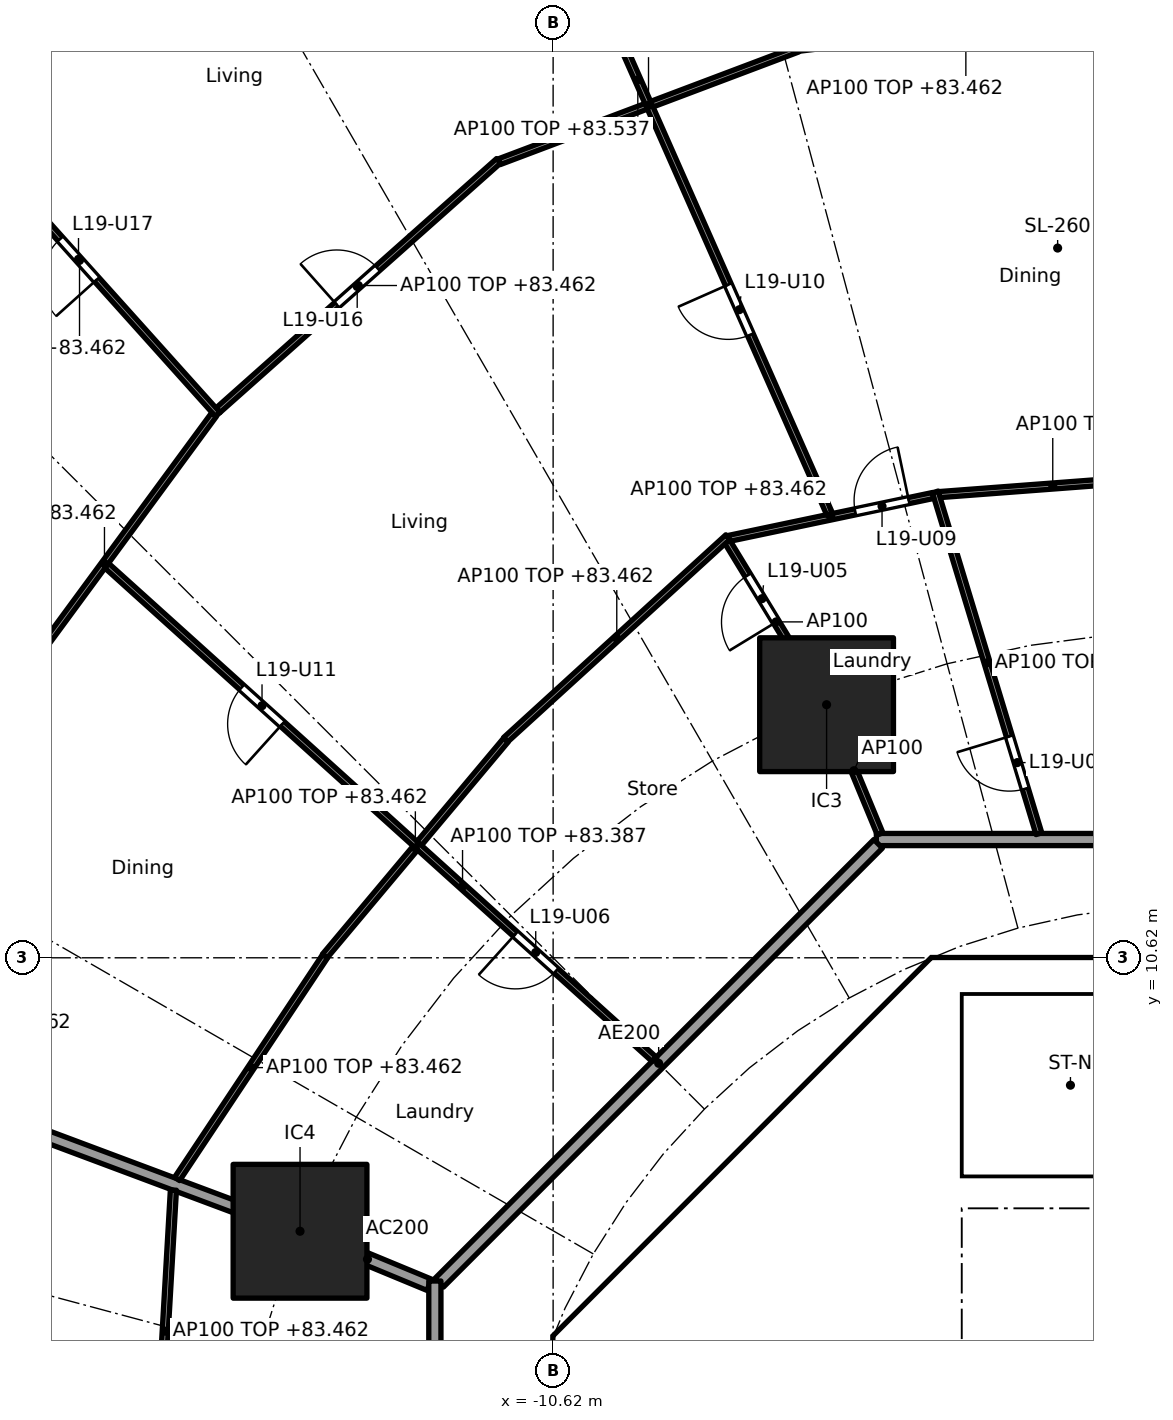
"""IFC4 building model, lengths in metres.
Left out: names, types, materials, properties, quantities, classifications, styles, units other than length and angle.
Written with IfcOpenShell. Run it as: python <this file> out.ifc"""

import sys

from ifc_helpers import new_model, si_unit, direction, frame, frame_2d, origin, origin_2d, place, context, subcontext, project, spatial, polyline, rectangle, outline, extrude, element, fill, save


model = new_model("IFC4")
c1 = context("Model", 3, precision=1e-05, world=origin(), true_north=direction((0.0, 1.0)))
c2 = subcontext(c1, "Body", "Model", "MODEL_VIEW")
j1 = project(units=[si_unit("LENGTHUNIT", "METRE"), si_unit("PLANEANGLEUNIT", "RADIAN")], contexts=[c1])
p1 = place(None, origin())
s1 = spatial("IfcSite", under=j1, at=p1, CompositionType="ELEMENT")
p2 = place(p1, origin())
s2 = spatial("IfcBuilding", under=s1, at=p2, CompositionType="ELEMENT")
p3 = place(p2, frame((0.0, 0.0, 80.7)))
s3 = spatial("IfcBuildingStorey", under=s2, at=p3, CompositionType="ELEMENT", Elevation=80.7)
for number, where, z_axis, x_axis in (
    (1, (-6.123, 14.782, 0.0), (0.0, 0.0, 1.0), (1.0, 0.0, 0.0)),
    (2, (-14.782, 6.123, 0.0), (0.0, 0.0, 1.0), (1.0, 0.0, 0.0)),
):
    element("IfcColumn", number, at=place(p3, frame(where, z_axis=z_axis, x_axis=x_axis)), inside=s3, PredefinedType="COLUMN", context=c2, shape_type="SweptSolid", body=[
        extrude(rectangle(XDim=2.2, YDim=2.2, at=origin_2d()), origin(), (0.0, 0.0, 1.0), 3.7),
    ])
p4 = place(p3, frame((-4.613, 9.988, 0.0), z_axis=(0.0, 0.0, 1.0), x_axis=(-0.707106781187, -0.707106781187, 0.0)))
e3 = element("IfcWall", 3, at=p4, inside=s3, PredefinedType="SHEAR", context=c2, shape_type="SweptSolid", body=[
    extrude(rectangle(XDim=7.602, YDim=0.6, at=frame_2d((3.801, 0.0))), origin(), (0.0, 0.0, 1.0), 3.44),
])
p5 = place(p4, frame((0.351, 0.0, 0.0)))
e4 = element("IfcOpeningElement", 4, at=p5, cuts=e3, PredefinedType="OPENING", context=c2, shape_type="SweptSolid", body=[
    extrude(rectangle(XDim=1.1, YDim=2.1, at=frame_2d((0.55, 1.05))), frame((0.0, 0.31, 0.0), z_axis=(0.0, -1.0, 0.0), x_axis=(1.0, 0.0, 0.0)), (0.0, 0.0, 1.0), 0.62),
])
p6 = place(p3, frame((-5.8, 4.3, 0.0), z_axis=(0.0, 0.0, 1.0), x_axis=(0.0, 1.0, 0.0)))
e5 = element("IfcWall", 5, at=p6, inside=s3, PredefinedType="PARTITIONING", context=c2, shape_type="SweptSolid", body=[
    extrude(rectangle(XDim=3.927, YDim=0.15, at=frame_2d((1.963, 0.0))), origin(), (0.0, 0.0, 1.0), 3.44),
])
p7 = place(p6, frame((1.551, 0.0, 0.0)))
e6 = element("IfcOpeningElement", 6, at=p7, cuts=e5, PredefinedType="OPENING", context=c2, shape_type="SweptSolid", body=[
    extrude(rectangle(XDim=0.9, YDim=2.1, at=frame_2d((0.45, 1.05))), frame((0.0, 0.085, 0.0), z_axis=(0.0, -1.0, 0.0), x_axis=(1.0, 0.0, 0.0)), (0.0, 0.0, 1.0), 0.17),
])
p8 = place(p3, frame((-4.0, 4.3, 0.0), z_axis=(0.0, 0.0, 1.0), x_axis=(0.0, 1.0, 0.0)))
e7 = element("IfcWall", 7, at=p8, inside=s3, PredefinedType="SOLIDWALL", context=c2, shape_type="SweptSolid", body=[
    extrude(rectangle(XDim=2.2, YDim=0.2, at=frame_2d((1.1, 0.0))), origin(), (0.0, 0.0, 1.0), 3.44),
])
p9 = place(p8, frame((0.55, 0.0, 0.0)))
e8 = element("IfcOpeningElement", 8, at=p9, cuts=e7, PredefinedType="OPENING", context=c2, shape_type="SweptSolid", body=[
    extrude(rectangle(XDim=1.1, YDim=2.1, at=frame_2d((0.55, 1.05))), frame((0.0, 0.11, 0.0), z_axis=(0.0, -1.0, 0.0), x_axis=(1.0, 0.0, 0.0)), (0.0, 0.0, 1.0), 0.22),
])
p10 = place(p3, origin())
e9 = element("IfcWall", 9, at=p10, inside=s3, PredefinedType="SHEAR", context=c2, shape_type="SweptSolid", body=[
    extrude(outline(polyline([(-10.2, 4.825), (-9.776, 4.401), (-10.025, 4.152), (-10.025, 3.801), (-10.625, 3.801), (-10.625, 4.401), (-10.2, 4.825)])), origin(), (0.0, 0.0, 1.0), 3.44),
])
p11 = place(p3, origin())
e10 = element("IfcWall", 10, at=p11, inside=s3, PredefinedType="SHEAR", context=c2, shape_type="SweptSolid", body=[
    extrude(outline(polyline([(-4.152, 10.025), (-4.401, 9.776), (-4.825, 10.2), (-4.401, 10.625), (4.401, 10.625), (4.825, 10.2), (4.401, 9.776), (4.152, 10.025), (-4.152, 10.025)])), origin(), (0.0, 0.0, 1.0), 3.44),
])
p12 = place(p3, origin())
e11 = element("IfcWall", 11, at=p12, inside=s3, PredefinedType="SOLIDWALL", context=c2, shape_type="SweptSolid", body=[
    extrude(outline(polyline([(-3.9, 7.025), (-4.1, 7.025), (-4.1, 10.025), (-3.9, 10.025), (-3.9, 7.025)])), origin(), (0.0, 0.0, 1.0), 3.44),
])
p13 = place(p3, origin())
e12 = element("IfcWall", 12, at=p13, inside=s3, PredefinedType="SOLIDWALL", context=c2, shape_type="SweptSolid", body=[
    extrude(outline(polyline([(4.1, 6.5), (-4.1, 6.5), (-4.1, 7.025), (4.1, 7.025), (4.1, 6.5)])), origin(), (0.0, 0.0, 1.0), 3.44),
])
p14 = place(p3, frame((-12.657, 5.243, 0.0), z_axis=(0.0, 0.0, 1.0), x_axis=(-0.923843626288, 0.382770106157, 0.0)))
e13 = element("IfcWall", 13, at=p14, inside=s3, PredefinedType="PARTITIONING", context=c2, shape_type="SweptSolid", body=[
    extrude(rectangle(XDim=2.199, YDim=0.2, at=frame_2d((1.1, 0.0))), origin(), (0.0, 0.0, 1.0), 3.44),
])
p15 = place(p3, frame((-14.829, 6.14, 0.0), z_axis=(0.0, 0.0, 1.0), x_axis=(-0.936597324342, 0.35040755134, 0.0)))
e14 = element("IfcWall", 14, at=p15, inside=s3, PredefinedType="PARTITIONING", context=c2, shape_type="SweptSolid", body=[
    extrude(rectangle(XDim=13.606, YDim=0.2, at=frame_2d((6.803, 0.0))), origin(), (0.0, 0.0, 1.0), 2.762),
])
p16 = place(p3, frame((5.104, 12.565, 0.0), z_axis=(0.0, 0.0, 1.0), x_axis=(-1.0, 0.0, 0.0)))
e15 = element("IfcWall", 15, at=p16, inside=s3, PredefinedType="PARTITIONING", context=c2, shape_type="SweptSolid", body=[
    extrude(rectangle(XDim=10.409, YDim=0.2, at=frame_2d((5.205, 0.0))), origin(), (0.0, 0.0, 1.0), 3.44),
])
p17 = place(p16, frame((0.751, 0.0, 0.0)))
e16 = element("IfcOpeningElement", 16, at=p17, cuts=e15, PredefinedType="OPENING", context=c2, shape_type="SweptSolid", body=[
    extrude(rectangle(XDim=1.0, YDim=2.1, at=frame_2d((0.5, 1.05))), frame((0.0, 0.11, 0.0), z_axis=(0.0, -1.0, 0.0), x_axis=(1.0, 0.0, 0.0)), (0.0, 0.0, 1.0), 0.22),
])
p18 = place(p3, frame((-5.275, 12.494, 0.0), z_axis=(0.0, 0.0, 1.0), x_axis=(-0.707106781187, -0.707106781187, 0.0)))
e17 = element("IfcWall", 17, at=p18, inside=s3, PredefinedType="PARTITIONING", context=c2, shape_type="SweptSolid", body=[
    extrude(rectangle(XDim=10.209, YDim=0.2, at=frame_2d((5.104, 0.0))), origin(), (0.0, 0.0, 1.0), 3.44),
])
p19 = place(p3, frame((-12.565, 5.304, 0.0), z_axis=(0.0, 0.0, 1.0), x_axis=(0.0, -1.0, 0.0)))
e18 = element("IfcWall", 18, at=p19, inside=s3, PredefinedType="PARTITIONING", context=c2, shape_type="SweptSolid", body=[
    extrude(rectangle(XDim=10.409, YDim=0.2, at=frame_2d((5.205, 0.0))), origin(), (0.0, 0.0, 1.0), 3.44),
])
p20 = place(p19, frame((4.804, 0.0, 0.0)))
e19 = element("IfcOpeningElement", 19, at=p20, cuts=e18, PredefinedType="OPENING", context=c2, shape_type="SweptSolid", body=[
    extrude(rectangle(XDim=1.0, YDim=2.1, at=frame_2d((0.5, 1.05))), frame((0.0, 0.11, 0.0), z_axis=(0.0, -1.0, 0.0), x_axis=(1.0, 0.0, 0.0)), (0.0, 0.0, 1.0), 0.22),
])
p21 = place(p3, frame((-0.536, 18.519, 0.0), z_axis=(0.0, 0.0, 1.0), x_axis=(-0.99715294352, -0.075405618017, 0.0)))
e20 = element("IfcWall", 20, at=p21, inside=s3, PredefinedType="PARTITIONING", context=c2, shape_type="SweptSolid", body=[
    extrude(rectangle(XDim=3.746, YDim=0.1, at=frame_2d((1.873, 0.0))), origin(), (0.0, 0.0, 1.0), 2.762),
])
p22 = place(p3, frame((-2.631, 12.66, 0.0), z_axis=(0.0, 0.0, 1.0), x_axis=(-0.290145836284, 0.956982441682, 0.0)))
e21 = element("IfcWall", 21, at=p22, inside=s3, PredefinedType="PARTITIONING", context=c2, shape_type="SweptSolid", body=[
    extrude(rectangle(XDim=5.873, YDim=0.1, at=frame_2d((2.937, 0.0))), origin(), (0.0, 0.0, 1.0), 2.687),
])
p23 = place(p22, frame((0.772, 0.0, 0.0)))
e22 = element("IfcOpeningElement", 22, at=p23, cuts=e21, PredefinedType="OPENING", context=c2, shape_type="SweptSolid", body=[
    extrude(rectangle(XDim=0.9, YDim=2.1, at=frame_2d((0.45, 1.05))), frame((0.0, 0.06, 0.0), z_axis=(0.0, -1.0, 0.0), x_axis=(1.0, 0.0, 0.0)), (0.0, 0.0, 1.0), 0.12),
])
p24 = place(p3, frame((-4.37, 18.223, 0.0), z_axis=(0.0, 0.0, 1.0), x_axis=(-0.978619056583, -0.205681166112, 0.0)))
e23 = element("IfcWall", 23, at=p24, inside=s3, PredefinedType="PARTITIONING", context=c2, shape_type="SweptSolid", body=[
    extrude(rectangle(XDim=3.438, YDim=0.1, at=frame_2d((1.719, 0.0))), origin(), (0.0, 0.0, 1.0), 2.762),
])
p25 = place(p24, frame((0.409, 0.0, 0.0)))
e24 = element("IfcOpeningElement", 24, at=p25, cuts=e23, PredefinedType="OPENING", context=c2, shape_type="SweptSolid", body=[
    extrude(rectangle(XDim=0.9, YDim=2.1, at=frame_2d((0.45, 1.05))), frame((0.0, 0.06, 0.0), z_axis=(0.0, -1.0, 0.0), x_axis=(1.0, 0.0, 0.0)), (0.0, 0.0, 1.0), 0.12),
])
p26 = place(p3, frame((-6.596, 25.563, 0.0), z_axis=(0.0, 0.0, 1.0), x_axis=(-0.9356162121, -0.353018843201, 0.0)))
e25 = element("IfcWall", 25, at=p26, inside=s3, PredefinedType="PARTITIONING", context=c2, shape_type="SweptSolid", body=[
    extrude(rectangle(XDim=5.249, YDim=0.1, at=frame_2d((2.625, 0.0))), origin(), (0.0, 0.0, 1.0), 2.762),
])
p27 = place(p3, frame((-6.072, 17.915, 0.0), z_axis=(0.0, 0.0, 1.0), x_axis=(-0.404139814253, 0.914697223422, 0.0)))
e26 = element("IfcWall", 26, at=p27, inside=s3, PredefinedType="PARTITIONING", context=c2, shape_type="SweptSolid", body=[
    extrude(rectangle(XDim=15.614, YDim=0.1, at=frame_2d((7.807, 0.0))), origin(), (0.0, 0.0, 1.0), 2.837),
])
p28 = place(p27, frame((3.226, 0.0, 0.0)))
e27 = element("IfcOpeningElement", 27, at=p28, cuts=e26, PredefinedType="OPENING", context=c2, shape_type="SweptSolid", body=[
    extrude(rectangle(XDim=0.9, YDim=2.1, at=frame_2d((0.45, 1.05))), frame((0.0, 0.06, 0.0), z_axis=(0.0, -1.0, 0.0), x_axis=(1.0, 0.0, 0.0)), (0.0, 0.0, 1.0), 0.12),
])
p29 = place(p3, frame((-5.243, 12.657, 0.0), z_axis=(0.0, 0.0, 1.0), x_axis=(-0.382703272338, 0.923871314276, 0.0)))
e28 = element("IfcWall", 28, at=p29, inside=s3, PredefinedType="PARTITIONING", context=c2, shape_type="SweptSolid", body=[
    extrude(rectangle(XDim=2.249, YDim=0.1, at=frame_2d((1.125, 0.0))), origin(), (0.0, 0.0, 1.0), 3.44),
])
p30 = place(p3, frame((-6.149, 14.825, 0.0), z_axis=(0.0, 0.0, 1.0), x_axis=(-0.520433196839, 0.853902387646, 0.0)))
e29 = element("IfcWall", 29, at=p30, inside=s3, PredefinedType="PARTITIONING", context=c2, shape_type="SweptSolid", body=[
    extrude(rectangle(XDim=3.09, YDim=0.1, at=frame_2d((1.545, 0.0))), origin(), (0.0, 0.0, 1.0), 3.44),
])
p31 = place(p30, frame((1.542, 0.0, 0.0)))
e30 = element("IfcOpeningElement", 30, at=p31, cuts=e29, PredefinedType="OPENING", context=c2, shape_type="SweptSolid", body=[
    extrude(rectangle(XDim=0.9, YDim=2.1, at=frame_2d((0.45, 1.05))), frame((0.0, 0.06, 0.0), z_axis=(0.0, -1.0, 0.0), x_axis=(1.0, 0.0, 0.0)), (0.0, 0.0, 1.0), 0.12),
])
p32 = place(p3, frame((-7.746, 17.539, 0.0), z_axis=(0.0, 0.0, 1.0), x_axis=(-0.738860434967, -0.673858484877, 0.0)))
e31 = element("IfcWall", 31, at=p32, inside=s3, PredefinedType="PARTITIONING", context=c2, shape_type="SweptSolid", body=[
    extrude(rectangle(XDim=4.947, YDim=0.1, at=frame_2d((2.473, 0.0))), origin(), (0.0, 0.0, 1.0), 2.762),
])
p33 = place(p3, frame((-11.516, 23.726, 0.0), z_axis=(0.0, 0.0, 1.0), x_axis=(-0.747428955243, -0.664341747043, 0.0)))
e32 = element("IfcWall", 32, at=p33, inside=s3, PredefinedType="PARTITIONING", context=c2, shape_type="SweptSolid", body=[
    extrude(rectangle(XDim=6.174, YDim=0.1, at=frame_2d((3.087, 0.0))), origin(), (0.0, 0.0, 1.0), 2.762),
])
p34 = place(p33, frame((2.662, 0.0, 0.0)))
e33 = element("IfcOpeningElement", 33, at=p34, cuts=e32, PredefinedType="OPENING", context=c2, shape_type="SweptSolid", body=[
    extrude(rectangle(XDim=0.9, YDim=2.1, at=frame_2d((0.45, 1.05))), frame((0.0, 0.06, 0.0), z_axis=(0.0, -1.0, 0.0), x_axis=(1.0, 0.0, 0.0)), (0.0, 0.0, 1.0), 0.12),
])
p35 = place(p3, frame((-11.396, 14.202, 0.0), z_axis=(0.0, 0.0, 1.0), x_axis=(-0.642475660273, -0.766306091557, 0.0)))
e34 = element("IfcWall", 34, at=p35, inside=s3, PredefinedType="PARTITIONING", context=c2, shape_type="SweptSolid", body=[
    extrude(rectangle(XDim=4.637, YDim=0.1, at=frame_2d((2.319, 0.0))), origin(), (0.0, 0.0, 1.0), 2.762),
])
p36 = place(p3, frame((-16.134, 19.554, 0.0), z_axis=(0.0, 0.0, 1.0), x_axis=(-0.667985610263, 0.74417418961, 0.0)))
e35 = element("IfcWall", 35, at=p36, inside=s3, PredefinedType="PARTITIONING", context=c2, shape_type="SweptSolid", body=[
    extrude(rectangle(XDim=6.809, YDim=0.1, at=frame_2d((3.405, 0.0))), origin(), (0.0, 0.0, 1.0), 2.762),
])
p37 = place(p36, frame((2.98, 0.0, 0.0)))
e36 = element("IfcOpeningElement", 36, at=p37, cuts=e35, PredefinedType="OPENING", context=c2, shape_type="SweptSolid", body=[
    extrude(rectangle(XDim=0.9, YDim=2.1, at=frame_2d((0.45, 1.05))), frame((0.0, 0.06, 0.0), z_axis=(0.0, -1.0, 0.0), x_axis=(1.0, 0.0, 0.0)), (0.0, 0.0, 1.0), 0.12),
])
p38 = place(p3, frame((-16.197, 19.551, 0.0), z_axis=(0.0, 0.0, 1.0), x_axis=(-0.592391983588, -0.80564988536, 0.0)))
e37 = element("IfcWall", 37, at=p38, inside=s3, PredefinedType="PARTITIONING", context=c2, shape_type="SweptSolid", body=[
    extrude(rectangle(XDim=6.08, YDim=0.1, at=frame_2d((3.04, 0.0))), origin(), (0.0, 0.0, 1.0), 2.762),
])
p39 = place(p3, frame((-8.959, 8.952, 0.0), z_axis=(0.0, 0.0, 1.0), x_axis=(-0.742679904999, 0.669646592398, 0.0)))
e38 = element("IfcWall", 38, at=p39, inside=s3, PredefinedType="PARTITIONING", context=c2, shape_type="SweptSolid", body=[
    extrude(rectangle(XDim=12.121, YDim=0.1, at=frame_2d((6.061, 0.0))), origin(), (0.0, 0.0, 1.0), 2.687),
])
p40 = place(p39, frame((2.172, 0.0, 0.0)))
e39 = element("IfcOpeningElement", 39, at=p40, cuts=e38, PredefinedType="OPENING", context=c2, shape_type="SweptSolid", body=[
    extrude(rectangle(XDim=0.9, YDim=2.1, at=frame_2d((0.45, 1.05))), frame((0.0, 0.06, 0.0), z_axis=(0.0, -1.0, 0.0), x_axis=(1.0, 0.0, 0.0)), (0.0, 0.0, 1.0), 0.12),
])
p41 = place(p39, frame((8.233, 0.0, 0.0)))
e40 = element("IfcOpeningElement", 40, at=p41, cuts=e38, PredefinedType="OPENING", context=c2, shape_type="SweptSolid", body=[
    extrude(rectangle(XDim=0.9, YDim=2.1, at=frame_2d((0.45, 1.05))), frame((0.0, 0.06, 0.0), z_axis=(0.0, -1.0, 0.0), x_axis=(1.0, 0.0, 0.0)), (0.0, 0.0, 1.0), 0.12),
])
p42 = place(p3, frame((-14.371, 10.645, 0.0), z_axis=(0.0, 0.0, 1.0), x_axis=(-0.553341009285, -0.832954817168, 0.0)))
e41 = element("IfcWall", 41, at=p42, inside=s3, PredefinedType="PARTITIONING", context=c2, shape_type="SweptSolid", body=[
    extrude(rectangle(XDim=4.396, YDim=0.1, at=frame_2d((2.198, 0.0))), origin(), (0.0, 0.0, 1.0), 2.762),
])
p43 = place(p3, frame((-16.865, 6.8, 0.0), z_axis=(0.0, 0.0, 1.0), x_axis=(-0.057758567218, -0.998330580476, 0.0)))
e42 = element("IfcWall", 42, at=p43, inside=s3, PredefinedType="PARTITIONING", context=c2, shape_type="SweptSolid", body=[
    extrude(rectangle(XDim=4.65, YDim=0.1, at=frame_2d((2.325, 0.0))), origin(), (0.0, 0.0, 1.0), 2.762),
])
p44 = place(p9, origin())
e43 = element("IfcDoor", 43, at=p44, inside=s3, OperationType="DOUBLE_DOOR_SLIDING", PredefinedType="DOOR", context=c2, shape_type="SweptSolid", body=[
    extrude(rectangle(XDim=1.1, YDim=2.1, at=frame_2d((0.55, 1.05))), frame((0.0, 0.025, 0.0), z_axis=(0.0, -1.0, 0.0), x_axis=(1.0, 0.0, 0.0)), (0.0, 0.0, 1.0), 0.05),
])
fill(e8, e43)
p45 = place(p7, origin())
e44 = element("IfcDoor", 44, at=p45, inside=s3, OperationType="SINGLE_SWING_RIGHT", PredefinedType="DOOR", context=c2, shape_type="SweptSolid", body=[
    extrude(rectangle(XDim=0.9, YDim=2.1, at=frame_2d((0.45, 1.05))), frame((0.0, 0.025, 0.0), z_axis=(0.0, -1.0, 0.0), x_axis=(1.0, 0.0, 0.0)), (0.0, 0.0, 1.0), 0.05),
])
fill(e6, e44)
p46 = place(p5, origin())
e45 = element("IfcDoor", 45, at=p46, inside=s3, OperationType="SINGLE_SWING_LEFT", PredefinedType="DOOR", context=c2, shape_type="SweptSolid", body=[
    extrude(rectangle(XDim=1.1, YDim=2.1, at=frame_2d((0.55, 1.05))), frame((0.0, 0.025, 0.0), z_axis=(0.0, -1.0, 0.0), x_axis=(1.0, 0.0, 0.0)), (0.0, 0.0, 1.0), 0.05),
])
fill(e4, e45)
p47 = place(p23, origin())
e46 = element("IfcDoor", 46, at=p47, inside=s3, OperationType="SINGLE_SWING_RIGHT", PredefinedType="DOOR", context=c2, shape_type="SweptSolid", body=[
    extrude(rectangle(XDim=0.9, YDim=2.1, at=frame_2d((0.45, 1.05))), frame((0.0, 0.025, 0.0), z_axis=(0.0, -1.0, 0.0), x_axis=(1.0, 0.0, 0.0)), (0.0, 0.0, 1.0), 0.05),
])
fill(e22, e46)
p48 = place(p31, origin())
e47 = element("IfcDoor", 47, at=p48, inside=s3, OperationType="SINGLE_SWING_LEFT", PredefinedType="DOOR", context=c2, shape_type="SweptSolid", body=[
    extrude(rectangle(XDim=0.9, YDim=2.1, at=frame_2d((0.45, 1.05))), frame((0.0, 0.025, 0.0), z_axis=(0.0, -1.0, 0.0), x_axis=(1.0, 0.0, 0.0)), (0.0, 0.0, 1.0), 0.05),
])
fill(e30, e47)
p49 = place(p40, origin())
e48 = element("IfcDoor", 48, at=p49, inside=s3, OperationType="SINGLE_SWING_RIGHT", PredefinedType="DOOR", context=c2, shape_type="SweptSolid", body=[
    extrude(rectangle(XDim=0.9, YDim=2.1, at=frame_2d((0.45, 1.05))), frame((0.0, 0.025, 0.0), z_axis=(0.0, -1.0, 0.0), x_axis=(1.0, 0.0, 0.0)), (0.0, 0.0, 1.0), 0.05),
])
fill(e39, e48)
p50 = place(p25, frame((0.9, 0.0, 0.0), x_axis=(-1.0, 0.0, 0.0)))
e49 = element("IfcDoor", 49, at=p50, inside=s3, OperationType="SINGLE_SWING_RIGHT", PredefinedType="DOOR", context=c2, shape_type="SweptSolid", body=[
    extrude(rectangle(XDim=0.9, YDim=2.1, at=frame_2d((0.45, 1.05))), frame((0.0, 0.025, 0.0), z_axis=(0.0, -1.0, 0.0), x_axis=(1.0, 0.0, 0.0)), (0.0, 0.0, 1.0), 0.05),
])
fill(e24, e49)
p51 = place(p28, origin())
e50 = element("IfcDoor", 50, at=p51, inside=s3, OperationType="SINGLE_SWING_RIGHT", PredefinedType="DOOR", context=c2, shape_type="SweptSolid", body=[
    extrude(rectangle(XDim=0.9, YDim=2.1, at=frame_2d((0.45, 1.05))), frame((0.0, 0.025, 0.0), z_axis=(0.0, -1.0, 0.0), x_axis=(1.0, 0.0, 0.0)), (0.0, 0.0, 1.0), 0.05),
])
fill(e27, e50)
p52 = place(p41, origin())
e51 = element("IfcDoor", 51, at=p52, inside=s3, OperationType="SINGLE_SWING_LEFT", PredefinedType="DOOR", context=c2, shape_type="SweptSolid", body=[
    extrude(rectangle(XDim=0.9, YDim=2.1, at=frame_2d((0.45, 1.05))), frame((0.0, 0.025, 0.0), z_axis=(0.0, -1.0, 0.0), x_axis=(1.0, 0.0, 0.0)), (0.0, 0.0, 1.0), 0.05),
])
fill(e40, e51)
p53 = place(p34, frame((0.9, 0.0, 0.0), x_axis=(-1.0, 0.0, 0.0)))
e52 = element("IfcDoor", 52, at=p53, inside=s3, OperationType="SINGLE_SWING_LEFT", PredefinedType="DOOR", context=c2, shape_type="SweptSolid", body=[
    extrude(rectangle(XDim=0.9, YDim=2.1, at=frame_2d((0.45, 1.05))), frame((0.0, 0.025, 0.0), z_axis=(0.0, -1.0, 0.0), x_axis=(1.0, 0.0, 0.0)), (0.0, 0.0, 1.0), 0.05),
])
fill(e33, e52)
p54 = place(p37, origin())
e53 = element("IfcDoor", 53, at=p54, inside=s3, OperationType="SINGLE_SWING_LEFT", PredefinedType="DOOR", context=c2, shape_type="SweptSolid", body=[
    extrude(rectangle(XDim=0.9, YDim=2.1, at=frame_2d((0.45, 1.05))), frame((0.0, 0.025, 0.0), z_axis=(0.0, -1.0, 0.0), x_axis=(1.0, 0.0, 0.0)), (0.0, 0.0, 1.0), 0.05),
])
fill(e36, e53)
save(model, sys.argv[1])
